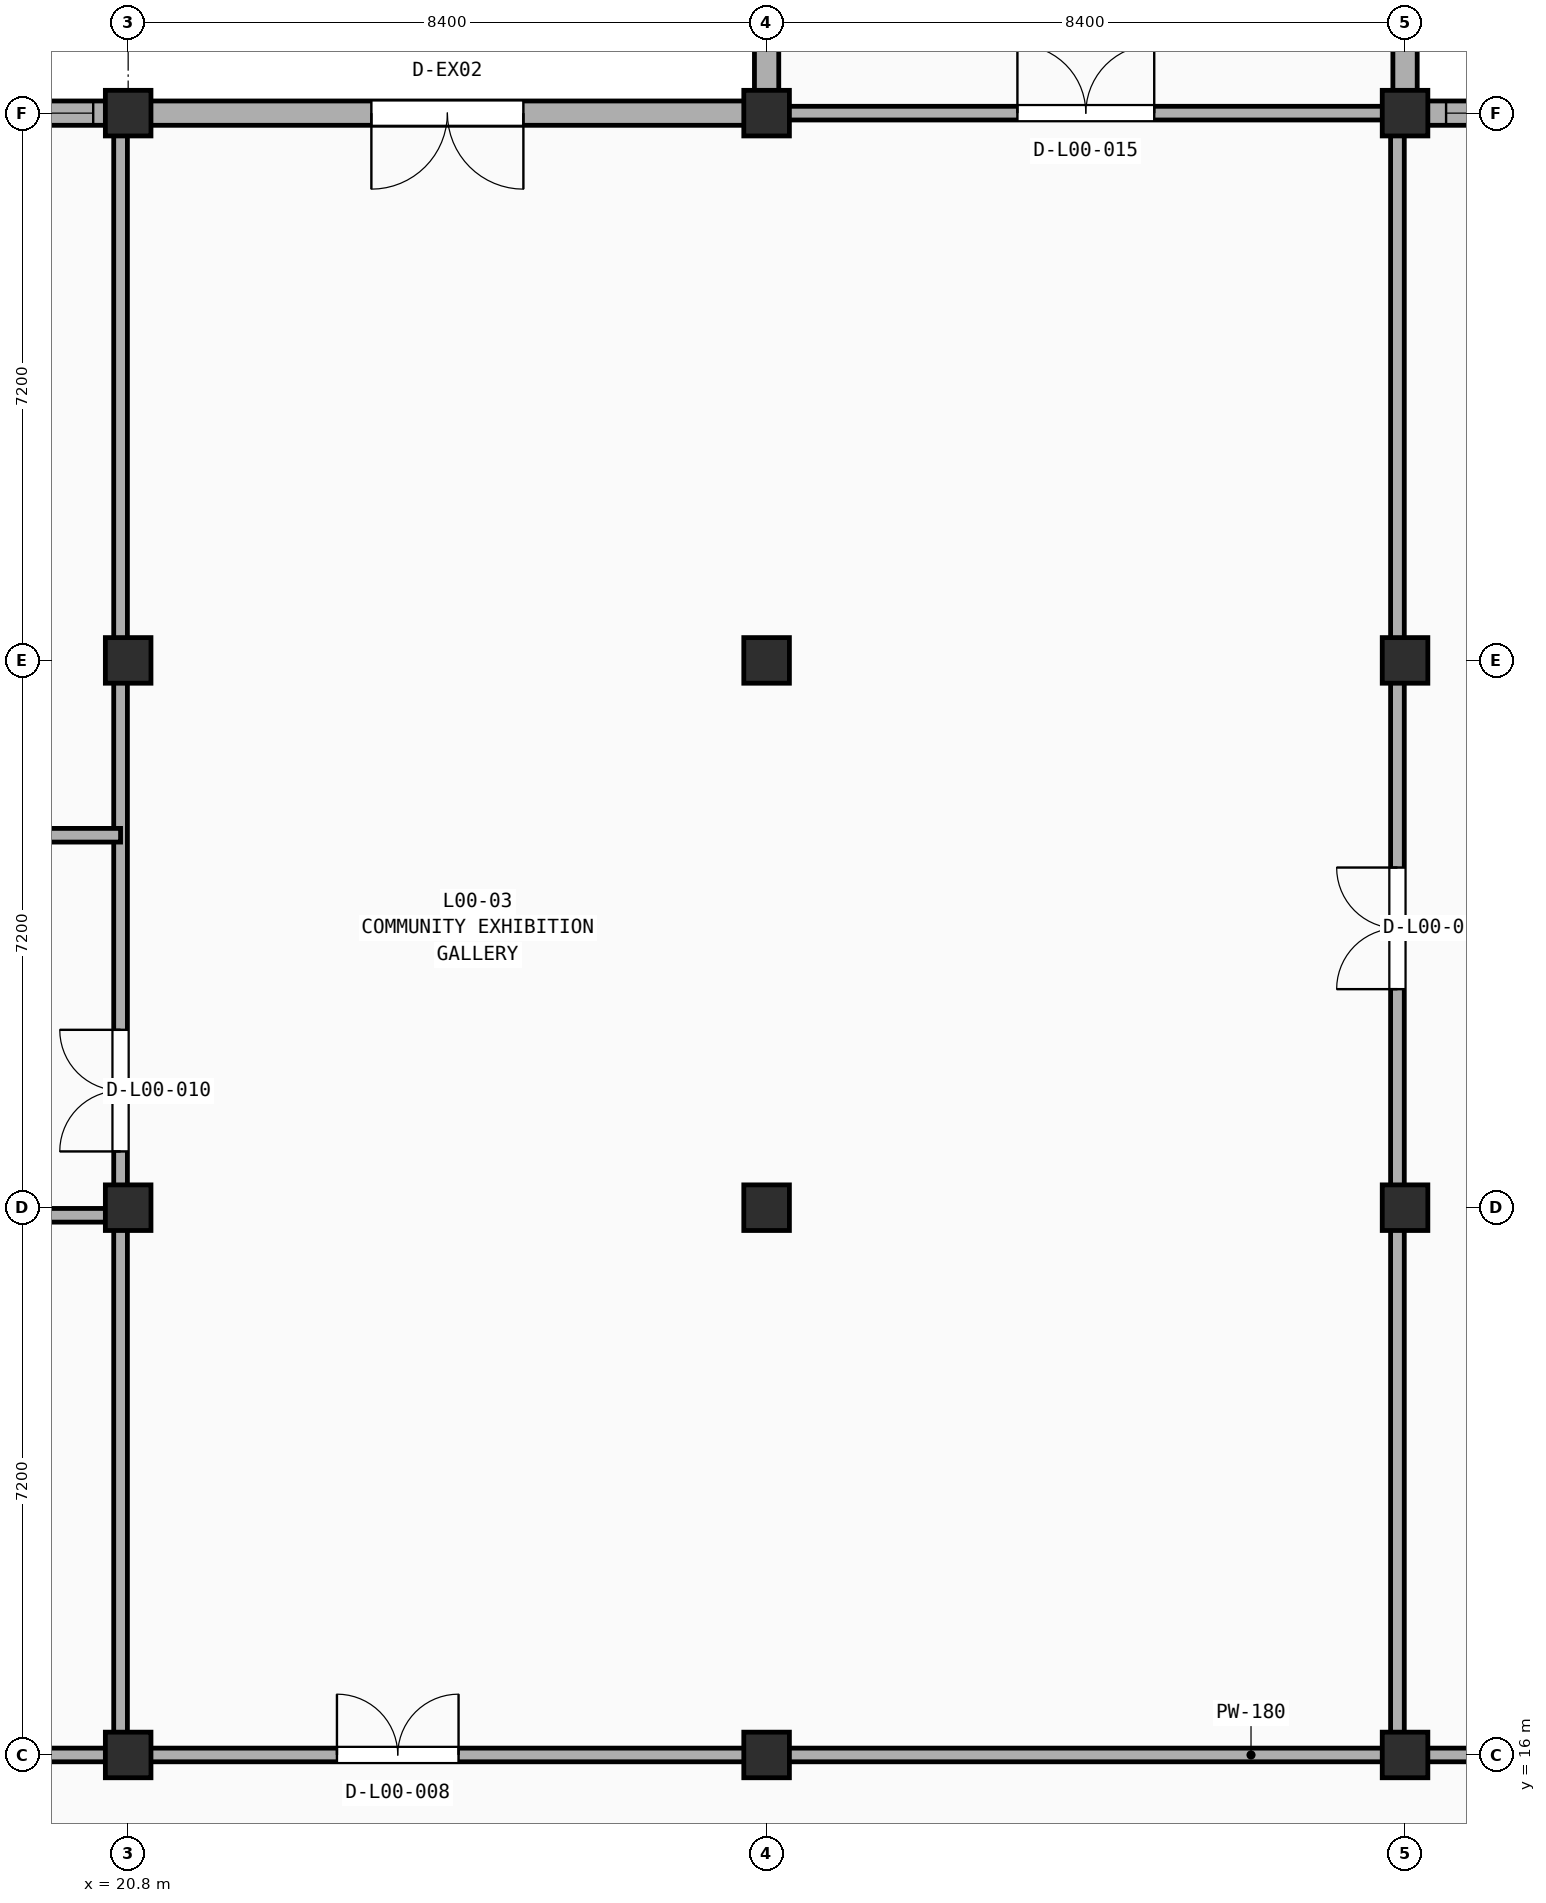
"""IFC4 building model, lengths in metres.
Left out: names, types, materials, properties, quantities, classifications, styles, units other than length and angle.
Written with IfcOpenShell. Run it as: python <this file> out.ifc"""

import sys

from ifc_helpers import new_model, si_unit, direction, frame, frame_2d, origin, origin_2d, place, context, subcontext, project, spatial, rectangle, extrude, element, fill, save


model = new_model("IFC4")
c1 = context("Model", 3, precision=1e-05, world=origin(), true_north=direction((0.0, 1.0)))
c2 = subcontext(c1, "Body", "Model", "MODEL_VIEW")
j1 = project(units=[si_unit("LENGTHUNIT", "METRE"), si_unit("PLANEANGLEUNIT", "RADIAN")], contexts=[c1])
p1 = place(None, origin())
s1 = spatial("IfcSite", under=j1, at=p1, CompositionType="ELEMENT")
p2 = place(p1, origin())
s2 = spatial("IfcBuilding", under=s1, at=p2, CompositionType="ELEMENT")
p3 = place(p2, origin())
s3 = spatial("IfcBuildingStorey", under=s2, at=p3, CompositionType="ELEMENT", Elevation=0.0)
for number, where, z_axis, x_axis in (
    (1, (20.8, 16.0, 0.0), (0.0, 0.0, 1.0), (1.0, 0.0, 0.0)),
    (2, (20.8, 23.2, 0.0), (0.0, 0.0, 1.0), (1.0, 0.0, 0.0)),
    (3, (20.8, 30.4, 0.0), (0.0, 0.0, 1.0), (1.0, 0.0, 0.0)),
    (4, (20.8, 37.6, 0.0), (0.0, 0.0, 1.0), (1.0, 0.0, 0.0)),
    (5, (29.2, 16.0, 0.0), (0.0, 0.0, 1.0), (1.0, 0.0, 0.0)),
    (6, (29.2, 23.2, 0.0), (0.0, 0.0, 1.0), (1.0, 0.0, 0.0)),
    (7, (29.2, 30.4, 0.0), (0.0, 0.0, 1.0), (1.0, 0.0, 0.0)),
    (8, (29.2, 37.6, 0.0), (0.0, 0.0, 1.0), (1.0, 0.0, 0.0)),
    (9, (37.6, 16.0, 0.0), (0.0, 0.0, 1.0), (1.0, 0.0, 0.0)),
    (10, (37.6, 23.2, 0.0), (0.0, 0.0, 1.0), (1.0, 0.0, 0.0)),
    (11, (37.6, 30.4, 0.0), (0.0, 0.0, 1.0), (1.0, 0.0, 0.0)),
    (12, (37.6, 37.6, 0.0), (0.0, 0.0, 1.0), (1.0, 0.0, 0.0)),
):
    element("IfcColumn", number, at=place(p3, frame(where, z_axis=z_axis, x_axis=x_axis)), inside=s3, PredefinedType="COLUMN", context=c2, shape_type="SweptSolid", body=[
        extrude(rectangle(XDim=0.6, YDim=0.6, at=origin_2d()), origin(), (0.0, 0.0, 1.0), 5.4),
    ])
p4 = place(p3, frame((12.4, 16.0, 0.0), z_axis=(0.0, 0.0, 1.0), x_axis=(1.0, 0.0, 0.0)))
e13 = element("IfcWall", 13, at=p4, inside=s3, PredefinedType="PARTITIONING", context=c2, shape_type="SweptSolid", body=[
    extrude(rectangle(XDim=33.45, YDim=0.18, at=frame_2d((16.725, 0.0))), origin(), (0.0, 0.0, 1.0), 3.99),
])
p5 = place(p4, frame((11.147, 0.0, -0.01)))
e14 = element("IfcOpeningElement", 14, at=p5, cuts=e13, PredefinedType="OPENING", context=c2, shape_type="SweptSolid", body=[
    extrude(rectangle(XDim=1.6, YDim=2.21, at=frame_2d((0.8, 1.105))), frame((0.0, 0.1, 0.0), z_axis=(0.0, -1.0, 0.0), x_axis=(1.0, 0.0, 0.0)), (0.0, 0.0, 1.0), 0.2),
])
p6 = place(p3, frame((20.7, 16.0, 0.0), z_axis=(0.0, 0.0, 1.0), x_axis=(0.0, 1.0, 0.0)))
e15 = element("IfcWall", 15, at=p6, inside=s3, PredefinedType="PARTITIONING", context=c2, shape_type="SweptSolid", body=[
    extrude(rectangle(XDim=21.45, YDim=0.18, at=frame_2d((10.725, 0.0))), origin(), (0.0, 0.0, 1.0), 4.54),
])
p7 = place(p6, frame((7.94, 0.0, -0.01)))
e16 = element("IfcOpeningElement", 16, at=p7, cuts=e15, PredefinedType="OPENING", context=c2, shape_type="SweptSolid", body=[
    extrude(rectangle(XDim=1.6, YDim=2.21, at=frame_2d((0.8, 1.105))), frame((0.0, 0.1, 0.0), z_axis=(0.0, -1.0, 0.0), x_axis=(1.0, 0.0, 0.0)), (0.0, 0.0, 1.0), 0.2),
])
p8 = place(p3, frame((37.5, 16.0, 0.0), z_axis=(0.0, 0.0, 1.0), x_axis=(0.0, 1.0, 0.0)))
e17 = element("IfcWall", 17, at=p8, inside=s3, PredefinedType="PARTITIONING", context=c2, shape_type="SweptSolid", body=[
    extrude(rectangle(XDim=21.75, YDim=0.18, at=frame_2d((10.875, 0.0))), origin(), (0.0, 0.0, 1.0), 4.54),
])
p9 = place(p8, frame((10.075, 0.0, -0.01)))
e18 = element("IfcOpeningElement", 18, at=p9, cuts=e17, PredefinedType="OPENING", context=c2, shape_type="SweptSolid", body=[
    extrude(rectangle(XDim=1.6, YDim=2.21, at=frame_2d((0.8, 1.105))), frame((0.0, 0.1, 0.0), z_axis=(0.0, -1.0, 0.0), x_axis=(1.0, 0.0, 0.0)), (0.0, 0.0, 1.0), 0.2),
])
p10 = place(p3, frame((12.4, 23.1, 0.0), z_axis=(0.0, 0.0, 1.0), x_axis=(1.0, 0.0, 0.0)))
e19 = element("IfcWall", 19, at=p10, inside=s3, PredefinedType="PARTITIONING", context=c2, shape_type="SweptSolid", body=[
    extrude(rectangle(XDim=8.3, YDim=0.18, at=frame_2d((4.15, 0.0))), origin(), (0.0, 0.0, 1.0), 4.54),
])
p11 = place(p10, frame((1.825, 0.0, -0.01)))
e20 = element("IfcOpeningElement", 20, at=p11, cuts=e19, PredefinedType="OPENING", context=c2, shape_type="SweptSolid", body=[
    extrude(rectangle(XDim=1.0, YDim=2.16, at=frame_2d((0.5, 1.08))), frame((0.0, 0.1, 0.0), z_axis=(0.0, -1.0, 0.0), x_axis=(1.0, 0.0, 0.0)), (0.0, 0.0, 1.0), 0.2),
])
p12 = place(p3, frame((12.4, 28.1, 0.0), z_axis=(0.0, 0.0, 1.0), x_axis=(1.0, 0.0, 0.0)))
e21 = element("IfcWall", 21, at=p12, inside=s3, PredefinedType="PARTITIONING", context=c2, shape_type="SweptSolid", body=[
    extrude(rectangle(XDim=8.3, YDim=0.18, at=frame_2d((4.15, 0.0))), origin(), (0.0, 0.0, 1.0), 4.64),
])
p13 = place(p12, frame((2.336, 0.0, -0.01)))
e22 = element("IfcOpeningElement", 22, at=p13, cuts=e21, PredefinedType="OPENING", context=c2, shape_type="SweptSolid", body=[
    extrude(rectangle(XDim=1.0, YDim=2.16, at=frame_2d((0.5, 1.08))), frame((0.0, 0.1, 0.0), z_axis=(0.0, -1.0, 0.0), x_axis=(1.0, 0.0, 0.0)), (0.0, 0.0, 1.0), 0.2),
])
p14 = place(p3, frame((29.35, 37.6, 0.0), z_axis=(0.0, 0.0, 1.0), x_axis=(1.0, 0.0, 0.0)))
e23 = element("IfcWall", 23, at=p14, inside=s3, PredefinedType="PARTITIONING", context=c2, shape_type="SweptSolid", body=[
    extrude(rectangle(XDim=8.1, YDim=0.18, at=frame_2d((4.05, 0.0))), origin(), (0.0, 0.0, 1.0), 4.64),
])
p15 = place(p14, frame((3.15, 0.0, -0.01)))
e24 = element("IfcOpeningElement", 24, at=p15, cuts=e23, PredefinedType="OPENING", context=c2, shape_type="SweptSolid", body=[
    extrude(rectangle(XDim=1.8, YDim=2.26, at=frame_2d((0.9, 1.13))), frame((0.0, 0.1, 0.0), z_axis=(0.0, -1.0, 0.0), x_axis=(1.0, 0.0, 0.0)), (0.0, 0.0, 1.0), 0.2),
])
p16 = place(p3, frame((20.8, 37.6, 0.0), z_axis=(0.0, 0.0, 1.0), x_axis=(-1.0, 0.0, 0.0)))
e25 = element("IfcWall", 25, at=p16, inside=s3, PredefinedType="SOLIDWALL", context=c2, shape_type="SweptSolid", body=[
    extrude(rectangle(XDim=8.4, YDim=0.32, at=frame_2d((4.2, 0.0))), origin(), (0.0, 0.0, 1.0), 4.64),
])
p17 = place(p16, frame((0.46, 0.0, 0.9)))
e26 = element("IfcOpeningElement", 26, at=p17, cuts=e25, PredefinedType="OPENING", context=c2, shape_type="SweptSolid", body=[
    extrude(rectangle(XDim=2.4, YDim=2.35, at=frame_2d((1.2, 1.175))), frame((0.0, 0.17, 0.0), z_axis=(0.0, -1.0, 0.0), x_axis=(1.0, 0.0, 0.0)), (0.0, 0.0, 1.0), 0.34),
])
p18 = place(p16, frame((5.46, 0.0, 0.9)))
e27 = element("IfcOpeningElement", 27, at=p18, cuts=e25, PredefinedType="OPENING", context=c2, shape_type="SweptSolid", body=[
    extrude(rectangle(XDim=2.4, YDim=2.35, at=frame_2d((1.2, 1.175))), frame((0.0, 0.17, 0.0), z_axis=(0.0, -1.0, 0.0), x_axis=(1.0, 0.0, 0.0)), (0.0, 0.0, 1.0), 0.34),
])
p19 = place(p3, frame((29.2, 37.6, 0.0), z_axis=(0.0, 0.0, 1.0), x_axis=(-1.0, 0.0, 0.0)))
e28 = element("IfcWall", 28, at=p19, inside=s3, PredefinedType="SOLIDWALL", context=c2, shape_type="SweptSolid", body=[
    extrude(rectangle(XDim=8.4, YDim=0.32, at=frame_2d((4.2, 0.0))), origin(), (0.0, 0.0, 1.0), 4.64),
])
p20 = place(p19, frame((3.2, 0.0, -0.01)))
e29 = element("IfcOpeningElement", 29, at=p20, cuts=e28, PredefinedType="OPENING", context=c2, shape_type="SweptSolid", body=[
    extrude(rectangle(XDim=2.0, YDim=2.41, at=frame_2d((1.0, 1.205))), frame((0.0, 0.17, 0.0), z_axis=(0.0, -1.0, 0.0), x_axis=(1.0, 0.0, 0.0)), (0.0, 0.0, 1.0), 0.34),
])
p21 = place(p3, frame((46.0, 37.6, 0.0), z_axis=(0.0, 0.0, 1.0), x_axis=(-1.0, 0.0, 0.0)))
e30 = element("IfcWall", 30, at=p21, inside=s3, PredefinedType="SOLIDWALL", context=c2, shape_type="SweptSolid", body=[
    extrude(rectangle(XDim=8.4, YDim=0.32, at=frame_2d((4.2, 0.0))), origin(), (0.0, 0.0, 1.0), 4.64),
])
p22 = place(p21, frame((0.46, 0.0, 0.9)))
e31 = element("IfcOpeningElement", 31, at=p22, cuts=e30, PredefinedType="OPENING", context=c2, shape_type="SweptSolid", body=[
    extrude(rectangle(XDim=2.4, YDim=2.35, at=frame_2d((1.2, 1.175))), frame((0.0, 0.17, 0.0), z_axis=(0.0, -1.0, 0.0), x_axis=(1.0, 0.0, 0.0)), (0.0, 0.0, 1.0), 0.34),
])
p23 = place(p21, frame((5.46, 0.0, 0.9)))
e32 = element("IfcOpeningElement", 32, at=p23, cuts=e30, PredefinedType="OPENING", context=c2, shape_type="SweptSolid", body=[
    extrude(rectangle(XDim=2.4, YDim=2.35, at=frame_2d((1.2, 1.175))), frame((0.0, 0.17, 0.0), z_axis=(0.0, -1.0, 0.0), x_axis=(1.0, 0.0, 0.0)), (0.0, 0.0, 1.0), 0.34),
])
p24 = place(p3, frame((29.2, 42.4, 0.0), z_axis=(0.0, 0.0, 1.0), x_axis=(0.0, -1.0, 0.0)))
e33 = element("IfcWall", 33, at=p24, inside=s3, PredefinedType="SOLIDWALL", context=c2, shape_type="SweptSolid", body=[
    extrude(rectangle(XDim=4.8, YDim=0.32, at=frame_2d((2.4, 0.0))), origin(), (0.0, 0.0, 1.0), 4.64),
])
p25 = place(p24, frame((1.46, 0.0, 0.9)))
e34 = element("IfcOpeningElement", 34, at=p25, cuts=e33, PredefinedType="OPENING", context=c2, shape_type="SweptSolid", body=[
    extrude(rectangle(XDim=1.8, YDim=2.2, at=frame_2d((0.9, 1.1))), frame((0.0, 0.17, 0.0), z_axis=(0.0, -1.0, 0.0), x_axis=(1.0, 0.0, 0.0)), (0.0, 0.0, 1.0), 0.34),
])
p26 = place(p3, frame((37.6, 37.6, 0.0), z_axis=(0.0, 0.0, 1.0), x_axis=(0.0, 1.0, 0.0)))
e35 = element("IfcWall", 35, at=p26, inside=s3, PredefinedType="SOLIDWALL", context=c2, shape_type="SweptSolid", body=[
    extrude(rectangle(XDim=4.8, YDim=0.32, at=frame_2d((2.4, 0.0))), origin(), (0.0, 0.0, 1.0), 4.64),
])
p27 = place(p26, frame((1.46, 0.0, 0.9)))
e36 = element("IfcOpeningElement", 36, at=p27, cuts=e35, PredefinedType="OPENING", context=c2, shape_type="SweptSolid", body=[
    extrude(rectangle(XDim=1.8, YDim=2.2, at=frame_2d((0.9, 1.1))), frame((0.0, 0.17, 0.0), z_axis=(0.0, -1.0, 0.0), x_axis=(1.0, 0.0, 0.0)), (0.0, 0.0, 1.0), 0.34),
])
p28 = place(p5, frame((0.0, 0.0, 0.01)))
e37 = element("IfcDoor", 37, at=p28, inside=s3, OperationType="DOUBLE_SWING_LEFT", PredefinedType="DOOR", context=c2, shape_type="SweptSolid", body=[
    extrude(rectangle(XDim=1.6, YDim=2.2, at=frame_2d((0.8, 1.1))), frame((0.0, 0.025, 0.0), z_axis=(0.0, -1.0, 0.0), x_axis=(1.0, 0.0, 0.0)), (0.0, 0.0, 1.0), 0.05),
])
fill(e14, e37)
p29 = place(p7, frame((0.0, 0.0, 0.01)))
e38 = element("IfcDoor", 38, at=p29, inside=s3, OperationType="DOUBLE_SWING_LEFT", PredefinedType="DOOR", context=c2, shape_type="SweptSolid", body=[
    extrude(rectangle(XDim=1.6, YDim=2.2, at=frame_2d((0.8, 1.1))), frame((0.0, 0.025, 0.0), z_axis=(0.0, -1.0, 0.0), x_axis=(1.0, 0.0, 0.0)), (0.0, 0.0, 1.0), 0.05),
])
fill(e16, e38)
p30 = place(p9, frame((0.0, 0.0, 0.01)))
e39 = element("IfcDoor", 39, at=p30, inside=s3, OperationType="DOUBLE_SWING_LEFT", PredefinedType="DOOR", context=c2, shape_type="SweptSolid", body=[
    extrude(rectangle(XDim=1.6, YDim=2.2, at=frame_2d((0.8, 1.1))), frame((0.0, 0.025, 0.0), z_axis=(0.0, -1.0, 0.0), x_axis=(1.0, 0.0, 0.0)), (0.0, 0.0, 1.0), 0.05),
])
fill(e18, e39)
p31 = place(p15, frame((1.8, 0.0, 0.01), z_axis=(0.0, 0.0, 1.0), x_axis=(-1.0, 0.0, 0.0)))
e40 = element("IfcDoor", 40, at=p31, inside=s3, OperationType="DOUBLE_SWING_LEFT", PredefinedType="DOOR", context=c2, shape_type="SweptSolid", body=[
    extrude(rectangle(XDim=1.8, YDim=2.25, at=frame_2d((0.9, 1.125))), frame((0.0, 0.025, 0.0), z_axis=(0.0, -1.0, 0.0), x_axis=(1.0, 0.0, 0.0)), (0.0, 0.0, 1.0), 0.05),
])
fill(e24, e40)
p32 = place(p17, origin())
e41 = element("IfcWindow", 41, at=p32, inside=s3, PartitioningType="TRIPLE_PANEL_VERTICAL", PredefinedType="WINDOW", context=c2, shape_type="SweptSolid", body=[
    extrude(rectangle(XDim=2.4, YDim=2.35, at=frame_2d((1.2, 1.175))), frame((0.0, 0.03, 0.0), z_axis=(0.0, -1.0, 0.0), x_axis=(1.0, 0.0, 0.0)), (0.0, 0.0, 1.0), 0.06),
])
fill(e26, e41)
p33 = place(p20, frame((0.0, 0.0, 0.01)))
e42 = element("IfcDoor", 42, at=p33, inside=s3, OperationType="DOUBLE_SWING_LEFT", PredefinedType="DOOR", context=c2, shape_type="SweptSolid", body=[
    extrude(rectangle(XDim=2.0, YDim=2.4, at=frame_2d((1.0, 1.2))), frame((0.0, 0.025, 0.0), z_axis=(0.0, -1.0, 0.0), x_axis=(1.0, 0.0, 0.0)), (0.0, 0.0, 1.0), 0.05),
])
fill(e29, e42)
p34 = place(p23, origin())
e43 = element("IfcWindow", 43, at=p34, inside=s3, PartitioningType="TRIPLE_PANEL_VERTICAL", PredefinedType="WINDOW", context=c2, shape_type="SweptSolid", body=[
    extrude(rectangle(XDim=2.4, YDim=2.35, at=frame_2d((1.2, 1.175))), frame((0.0, 0.03, 0.0), z_axis=(0.0, -1.0, 0.0), x_axis=(1.0, 0.0, 0.0)), (0.0, 0.0, 1.0), 0.06),
])
fill(e32, e43)
save(model, sys.argv[1])
